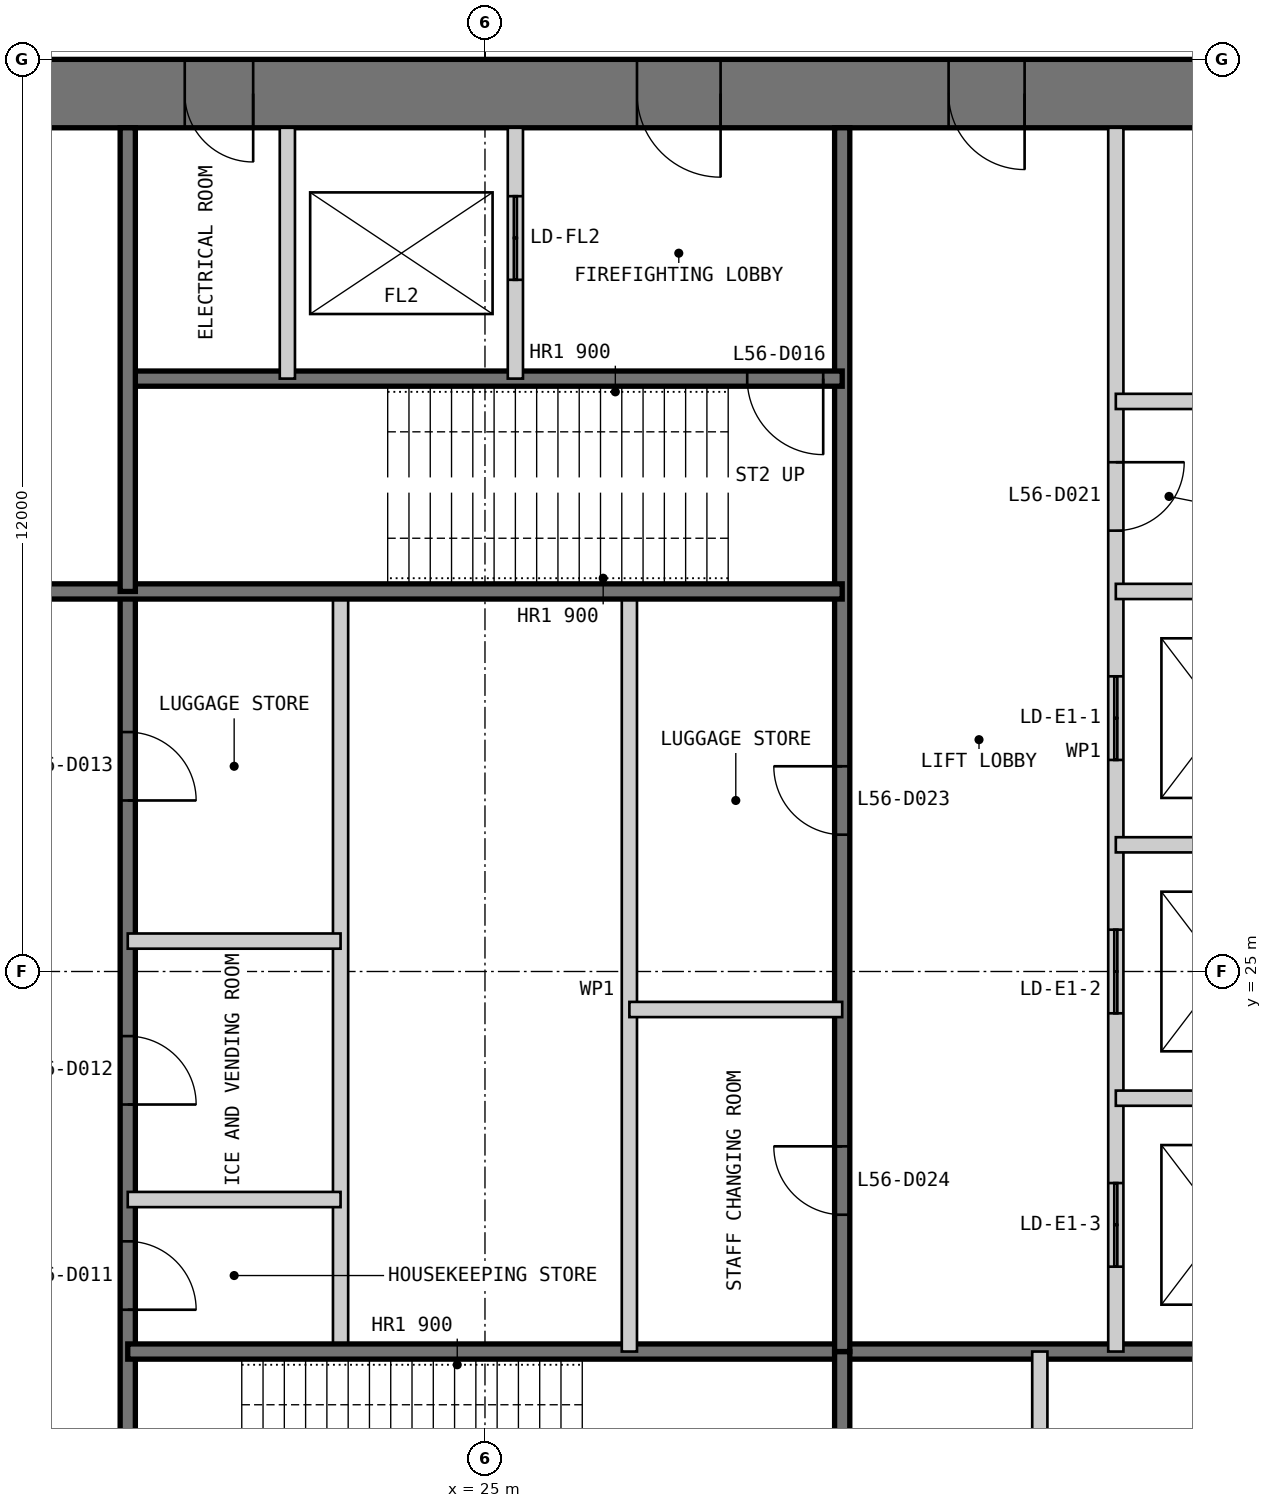
"""IFC4 building model, lengths in metres.
Left out: names, types, materials, properties, quantities, classifications, styles, units other than length and angle.
Written with IfcOpenShell. Run it as: python <this file> out.ifc"""

import sys

from ifc_helpers import new_model, si_unit, direction, frame, frame_2d, origin, place, context, subcontext, project, spatial, polyline, rectangle, outline, extrude, element, fill, save


model = new_model("IFC4")
c1 = context("Model", 3, precision=1e-05, world=origin(), true_north=direction((0.0, 1.0)))
c2 = subcontext(c1, "Body", "Model", "MODEL_VIEW")
j1 = project(units=[si_unit("LENGTHUNIT", "METRE"), si_unit("PLANEANGLEUNIT", "RADIAN")], contexts=[c1])
p1 = place(None, origin())
s1 = spatial("IfcSite", under=j1, at=p1, CompositionType="ELEMENT")
p2 = place(p1, origin())
s2 = spatial("IfcBuilding", under=s1, at=p2, CompositionType="ELEMENT")
p3 = place(p2, frame((0.0, 0.0, 239.8)))
s3 = spatial("IfcBuildingStorey", under=s2, at=p3, CompositionType="ELEMENT", Elevation=239.8)
p4 = place(p3, frame((37.0, 36.55, 0.0), z_axis=(0.0, 0.0, 1.0), x_axis=(-1.0, 0.0, 0.0)))
e1 = element("IfcWall", 1, at=p4, inside=s3, PredefinedType="SHEAR", context=c2, shape_type="SweptSolid", body=[
    extrude(outline(polyline([(0.0, -0.45), (24.0, -0.45), (23.1, 0.45), (0.9, 0.45), (0.0, -0.45)])), origin(), (0.0, 0.0, 1.0), 6.0),
])
p5 = place(p4, frame((4.9, 0.0, 0.0)))
e2 = element("IfcOpeningElement", 2, at=p5, cuts=e1, PredefinedType="OPENING", context=c2, shape_type="SweptSolid", body=[
    extrude(rectangle(XDim=1.0, YDim=2.2, at=frame_2d((0.5, 1.1))), frame((0.0, 0.46, 0.0), z_axis=(0.0, -1.0, 0.0), x_axis=(1.0, 0.0, 0.0)), (0.0, 0.0, 1.0), 0.92),
])
p6 = place(p4, frame((8.9, 0.0, 0.0)))
e3 = element("IfcOpeningElement", 3, at=p6, cuts=e1, PredefinedType="OPENING", context=c2, shape_type="SweptSolid", body=[
    extrude(rectangle(XDim=1.1, YDim=2.2, at=frame_2d((0.55, 1.1))), frame((0.0, 0.46, 0.0), z_axis=(0.0, -1.0, 0.0), x_axis=(1.0, 0.0, 0.0)), (0.0, 0.0, 1.0), 0.92),
])
p7 = place(p4, frame((15.05, 0.0, 0.0)))
e4 = element("IfcOpeningElement", 4, at=p7, cuts=e1, PredefinedType="OPENING", context=c2, shape_type="SweptSolid", body=[
    extrude(rectangle(XDim=0.9, YDim=2.2, at=frame_2d((0.45, 1.1))), frame((0.0, 0.46, 0.0), z_axis=(0.0, -1.0, 0.0), x_axis=(1.0, 0.0, 0.0)), (0.0, 0.0, 1.0), 0.92),
])
p8 = place(p4, frame((17.9, 0.0, 0.0)))
e5 = element("IfcOpeningElement", 5, at=p8, cuts=e1, PredefinedType="OPENING", context=c2, shape_type="SweptSolid", body=[
    extrude(rectangle(XDim=1.0, YDim=2.2, at=frame_2d((0.5, 1.1))), frame((0.0, 0.46, 0.0), z_axis=(0.0, -1.0, 0.0), x_axis=(1.0, 0.0, 0.0)), (0.0, 0.0, 1.0), 0.92),
])
p9 = place(p4, frame((21.4, 0.0, 0.0)))
e6 = element("IfcOpeningElement", 6, at=p9, cuts=e1, PredefinedType="OPENING", context=c2, shape_type="SweptSolid", body=[
    extrude(rectangle(XDim=1.0, YDim=2.2, at=frame_2d((0.5, 1.1))), frame((0.0, 0.46, 0.0), z_axis=(0.0, -1.0, 0.0), x_axis=(1.0, 0.0, 0.0)), (0.0, 0.0, 1.0), 0.92),
])
p10 = place(p3, frame((20.3, 13.9, 0.0), z_axis=(0.0, 0.0, 1.0), x_axis=(0.0, 1.0, 0.0)))
e7 = element("IfcWall", 7, at=p10, inside=s3, PredefinedType="SOLIDWALL", context=c2, shape_type="SweptSolid", body=[
    extrude(rectangle(XDim=16.1, YDim=0.2, at=frame_2d((8.05, 0.0))), origin(), (0.0, 0.0, 1.0), 5.8),
])
p11 = place(p10, frame((6.65, 0.0, 0.0)))
e8 = element("IfcOpeningElement", 8, at=p11, cuts=e7, PredefinedType="OPENING", context=c2, shape_type="SweptSolid", body=[
    extrude(rectangle(XDim=0.9, YDim=2.2, at=frame_2d((0.45, 1.1))), frame((0.0, 0.11, 0.0), z_axis=(0.0, -1.0, 0.0), x_axis=(1.0, 0.0, 0.0)), (0.0, 0.0, 1.0), 0.22),
])
p12 = place(p10, frame((9.35, 0.0, 0.0)))
e9 = element("IfcOpeningElement", 9, at=p12, cuts=e7, PredefinedType="OPENING", context=c2, shape_type="SweptSolid", body=[
    extrude(rectangle(XDim=0.9, YDim=2.2, at=frame_2d((0.45, 1.1))), frame((0.0, 0.11, 0.0), z_axis=(0.0, -1.0, 0.0), x_axis=(1.0, 0.0, 0.0)), (0.0, 0.0, 1.0), 0.22),
])
p13 = place(p10, frame((13.35, 0.0, 0.0)))
e10 = element("IfcOpeningElement", 10, at=p13, cuts=e7, PredefinedType="OPENING", context=c2, shape_type="SweptSolid", body=[
    extrude(rectangle(XDim=0.9, YDim=2.2, at=frame_2d((0.45, 1.1))), frame((0.0, 0.11, 0.0), z_axis=(0.0, -1.0, 0.0), x_axis=(1.0, 0.0, 0.0)), (0.0, 0.0, 1.0), 0.22),
])
p14 = place(p3, frame((23.1, 20.0, 0.0), z_axis=(0.0, 0.0, 1.0), x_axis=(0.0, 1.0, 0.0)))
e11 = element("IfcWall", 11, at=p14, inside=s3, PredefinedType="PARTITIONING", context=c2, shape_type="SweptSolid", body=[
    extrude(rectangle(XDim=10.0, YDim=0.2, at=frame_2d((5.0, 0.0))), origin(), (0.0, 0.0, 1.0), 5.8),
])
p15 = place(p3, frame((20.3, 20.0, 0.0), z_axis=(0.0, 0.0, 1.0), x_axis=(1.0, 0.0, 0.0)))
e12 = element("IfcWall", 12, at=p15, inside=s3, PredefinedType="SOLIDWALL", context=c2, shape_type="SweptSolid", body=[
    extrude(rectangle(XDim=15.8, YDim=0.2, at=frame_2d((7.9, 0.0))), origin(), (0.0, 0.0, 1.0), 5.8),
])
p16 = place(p3, frame((29.7, 13.9, 0.0), z_axis=(0.0, 0.0, 1.0), x_axis=(0.0, 1.0, 0.0)))
e13 = element("IfcWall", 13, at=p16, inside=s3, PredefinedType="SOLIDWALL", context=c2, shape_type="SweptSolid", body=[
    extrude(rectangle(XDim=6.1, YDim=0.2, at=frame_2d((3.05, 0.0))), origin(), (0.0, 0.0, 1.0), 5.8),
])
p17 = place(p3, frame((32.3, 13.9, 0.0), z_axis=(0.0, 0.0, 1.0), x_axis=(0.0, 1.0, 0.0)))
e14 = element("IfcWall", 14, at=p17, inside=s3, PredefinedType="PARTITIONING", context=c2, shape_type="SweptSolid", body=[
    extrude(rectangle(XDim=6.1, YDim=0.2, at=frame_2d((3.05, 0.0))), origin(), (0.0, 0.0, 1.0), 5.8),
])
for number, where, z_axis, x_axis in (
    (15, (20.3, 22.0, 0.0), (0.0, 0.0, 1.0), (1.0, 0.0, 0.0)),
    (16, (20.3, 25.4, 0.0), (0.0, 0.0, 1.0), (1.0, 0.0, 0.0)),
):
    element("IfcWall", number, at=place(p3, frame(where, z_axis=z_axis, x_axis=x_axis)), inside=s3, PredefinedType="PARTITIONING", context=c2, shape_type="SweptSolid", body=[
        extrude(rectangle(XDim=2.8, YDim=0.2, at=frame_2d((1.4, 0.0))), origin(), (0.0, 0.0, 1.0), 5.8),
    ])
p18 = place(p3, frame((33.3, 36.1, 0.0), z_axis=(0.0, 0.0, 1.0), x_axis=(0.0, -1.0, 0.0)))
e17 = element("IfcWall", 17, at=p18, inside=s3, PredefinedType="PARTITIONING", context=c2, shape_type="SweptSolid", body=[
    extrude(rectangle(XDim=16.1, YDim=0.2, at=frame_2d((8.05, 0.0))), origin(), (0.0, 0.0, 1.0), 5.8),
])
p19 = place(p18, frame((4.4, 0.0, 0.0)))
e18 = element("IfcOpeningElement", 18, at=p19, cuts=e17, PredefinedType="OPENING", context=c2, shape_type="SweptSolid", body=[
    extrude(rectangle(XDim=0.9, YDim=2.2, at=frame_2d((0.45, 1.1))), frame((0.0, 0.11, 0.0), z_axis=(0.0, -1.0, 0.0), x_axis=(1.0, 0.0, 0.0)), (0.0, 0.0, 1.0), 0.22),
])
p20 = place(p18, frame((7.217, 0.0, 0.0)))
e19 = element("IfcOpeningElement", 19, at=p20, cuts=e17, PredefinedType="OPENING", context=c2, shape_type="SweptSolid", body=[
    extrude(rectangle(XDim=1.1, YDim=2.2, at=frame_2d((0.55, 1.1))), frame((0.0, 0.11, 0.0), z_axis=(0.0, -1.0, 0.0), x_axis=(1.0, 0.0, 0.0)), (0.0, 0.0, 1.0), 0.22),
])
p21 = place(p18, frame((10.55, 0.0, 0.0)))
e20 = element("IfcOpeningElement", 20, at=p21, cuts=e17, PredefinedType="OPENING", context=c2, shape_type="SweptSolid", body=[
    extrude(rectangle(XDim=1.1, YDim=2.2, at=frame_2d((0.55, 1.1))), frame((0.0, 0.11, 0.0), z_axis=(0.0, -1.0, 0.0), x_axis=(1.0, 0.0, 0.0)), (0.0, 0.0, 1.0), 0.22),
])
p22 = place(p18, frame((13.883, 0.0, 0.0)))
e21 = element("IfcOpeningElement", 21, at=p22, cuts=e17, PredefinedType="OPENING", context=c2, shape_type="SweptSolid", body=[
    extrude(rectangle(XDim=1.1, YDim=2.2, at=frame_2d((0.55, 1.1))), frame((0.0, 0.11, 0.0), z_axis=(0.0, -1.0, 0.0), x_axis=(1.0, 0.0, 0.0)), (0.0, 0.0, 1.0), 0.22),
])
p23 = place(p3, frame((29.7, 36.1, 0.0), z_axis=(0.0, 0.0, 1.0), x_axis=(0.0, -1.0, 0.0)))
e22 = element("IfcWall", 22, at=p23, inside=s3, PredefinedType="SOLIDWALL", context=c2, shape_type="SweptSolid", body=[
    extrude(rectangle(XDim=16.1, YDim=0.2, at=frame_2d((8.05, 0.0))), origin(), (0.0, 0.0, 1.0), 5.8),
])
p24 = place(p23, frame((8.4, 0.0, 0.0)))
e23 = element("IfcOpeningElement", 23, at=p24, cuts=e22, PredefinedType="OPENING", context=c2, shape_type="SweptSolid", body=[
    extrude(rectangle(XDim=0.9, YDim=2.2, at=frame_2d((0.45, 1.1))), frame((0.0, 0.11, 0.0), z_axis=(0.0, -1.0, 0.0), x_axis=(1.0, 0.0, 0.0)), (0.0, 0.0, 1.0), 0.22),
])
p25 = place(p23, frame((13.4, 0.0, 0.0)))
e24 = element("IfcOpeningElement", 24, at=p25, cuts=e22, PredefinedType="OPENING", context=c2, shape_type="SweptSolid", body=[
    extrude(rectangle(XDim=0.9, YDim=2.2, at=frame_2d((0.45, 1.1))), frame((0.0, 0.11, 0.0), z_axis=(0.0, -1.0, 0.0), x_axis=(1.0, 0.0, 0.0)), (0.0, 0.0, 1.0), 0.22),
])
for number, where, z_axis, x_axis in (
    (25, (36.1, 30.0, 0.0), (0.0, 0.0, 1.0), (-1.0, 0.0, 0.0)),
    (26, (36.1, 26.667, 0.0), (0.0, 0.0, 1.0), (-1.0, 0.0, 0.0)),
    (27, (36.1, 23.333, 0.0), (0.0, 0.0, 1.0), (-1.0, 0.0, 0.0)),
):
    element("IfcWall", number, at=place(p3, frame(where, z_axis=z_axis, x_axis=x_axis)), inside=s3, PredefinedType="PARTITIONING", context=c2, shape_type="SweptSolid", body=[
        extrude(rectangle(XDim=2.8, YDim=0.2, at=frame_2d((1.4, 0.0))), origin(), (0.0, 0.0, 1.0), 5.8),
    ])
p26 = place(p3, frame((26.9, 30.0, 0.0), z_axis=(0.0, 0.0, 1.0), x_axis=(0.0, -1.0, 0.0)))
e28 = element("IfcWall", 28, at=p26, inside=s3, PredefinedType="PARTITIONING", context=c2, shape_type="SweptSolid", body=[
    extrude(rectangle(XDim=10.0, YDim=0.2, at=frame_2d((5.0, 0.0))), origin(), (0.0, 0.0, 1.0), 5.8),
])
p27 = place(p3, frame((29.7, 32.8, 0.0), z_axis=(0.0, 0.0, 1.0), x_axis=(-1.0, 0.0, 0.0)))
e29 = element("IfcWall", 29, at=p27, inside=s3, PredefinedType="SOLIDWALL", context=c2, shape_type="SweptSolid", body=[
    extrude(rectangle(XDim=9.4, YDim=0.2, at=frame_2d((4.7, 0.0))), origin(), (0.0, 0.0, 1.0), 5.8),
])
p28 = place(p27, frame((0.25, 0.0, 0.0)))
e30 = element("IfcOpeningElement", 30, at=p28, cuts=e29, PredefinedType="OPENING", context=c2, shape_type="SweptSolid", body=[
    extrude(rectangle(XDim=1.0, YDim=2.2, at=frame_2d((0.5, 1.1))), frame((0.0, 0.11, 0.0), z_axis=(0.0, -1.0, 0.0), x_axis=(1.0, 0.0, 0.0)), (0.0, 0.0, 1.0), 0.22),
])
p29 = place(p3, frame((29.7, 30.0, 0.0), z_axis=(0.0, 0.0, 1.0), x_axis=(-1.0, 0.0, 0.0)))
e31 = element("IfcWall", 31, at=p29, inside=s3, PredefinedType="SOLIDWALL", context=c2, shape_type="SweptSolid", body=[
    extrude(rectangle(XDim=15.8, YDim=0.2, at=frame_2d((7.9, 0.0))), origin(), (0.0, 0.0, 1.0), 5.8),
])
p30 = place(p3, frame((25.4, 36.1, 0.0), z_axis=(0.0, 0.0, 1.0), x_axis=(0.0, -1.0, 0.0)))
e32 = element("IfcWall", 32, at=p30, inside=s3, PredefinedType="PARTITIONING", context=c2, shape_type="SweptSolid", body=[
    extrude(rectangle(XDim=3.3, YDim=0.2, at=frame_2d((1.65, 0.0))), origin(), (0.0, 0.0, 1.0), 5.8),
])
p31 = place(p30, frame((0.9, 0.0, 0.0)))
e33 = element("IfcOpeningElement", 33, at=p31, cuts=e32, PredefinedType="OPENING", context=c2, shape_type="SweptSolid", body=[
    extrude(rectangle(XDim=1.1, YDim=2.2, at=frame_2d((0.55, 1.1))), frame((0.0, 0.11, 0.0), z_axis=(0.0, -1.0, 0.0), x_axis=(1.0, 0.0, 0.0)), (0.0, 0.0, 1.0), 0.22),
])
p32 = place(p3, frame((22.4, 36.1, 0.0), z_axis=(0.0, 0.0, 1.0), x_axis=(0.0, -1.0, 0.0)))
e34 = element("IfcWall", 34, at=p32, inside=s3, PredefinedType="PARTITIONING", context=c2, shape_type="SweptSolid", body=[
    extrude(rectangle(XDim=3.3, YDim=0.2, at=frame_2d((1.65, 0.0))), origin(), (0.0, 0.0, 1.0), 5.8),
])
p33 = place(p3, frame((20.3, 36.1, 0.0), z_axis=(0.0, 0.0, 1.0), x_axis=(0.0, -1.0, 0.0)))
e35 = element("IfcWall", 35, at=p33, inside=s3, PredefinedType="SOLIDWALL", context=c2, shape_type="SweptSolid", body=[
    extrude(rectangle(XDim=6.1, YDim=0.2, at=frame_2d((3.05, 0.0))), origin(), (0.0, 0.0, 1.0), 5.8),
])
for number, where, z_axis, x_axis in (
    (36, (36.1, 32.5, 0.0), (0.0, 0.0, 1.0), (-1.0, 0.0, 0.0)),
    (37, (29.7, 24.5, 0.0), (0.0, 0.0, 1.0), (-1.0, 0.0, 0.0)),
):
    element("IfcWall", number, at=place(p3, frame(where, z_axis=z_axis, x_axis=x_axis)), inside=s3, PredefinedType="PARTITIONING", context=c2, shape_type="SweptSolid", body=[
        extrude(rectangle(XDim=2.8, YDim=0.2, at=frame_2d((1.4, 0.0))), origin(), (0.0, 0.0, 1.0), 5.8),
    ])
p34 = place(p11, frame((0.9, 0.0, 0.0), z_axis=(0.0, 0.0, 1.0), x_axis=(-1.0, 0.0, 0.0)))
e38 = element("IfcDoor", 38, at=p34, inside=s3, OperationType="SINGLE_SWING_RIGHT", PredefinedType="DOOR", context=c2, shape_type="SweptSolid", body=[
    extrude(rectangle(XDim=0.9, YDim=2.2, at=frame_2d((0.45, 1.1))), frame((0.0, 0.025, 0.0), z_axis=(0.0, -1.0, 0.0), x_axis=(1.0, 0.0, 0.0)), (0.0, 0.0, 1.0), 0.05),
])
fill(e8, e38)
p35 = place(p12, frame((0.9, 0.0, 0.0), z_axis=(0.0, 0.0, 1.0), x_axis=(-1.0, 0.0, 0.0)))
e39 = element("IfcDoor", 39, at=p35, inside=s3, OperationType="SINGLE_SWING_RIGHT", PredefinedType="DOOR", context=c2, shape_type="SweptSolid", body=[
    extrude(rectangle(XDim=0.9, YDim=2.2, at=frame_2d((0.45, 1.1))), frame((0.0, 0.025, 0.0), z_axis=(0.0, -1.0, 0.0), x_axis=(1.0, 0.0, 0.0)), (0.0, 0.0, 1.0), 0.05),
])
fill(e9, e39)
p36 = place(p13, frame((0.9, 0.0, 0.0), z_axis=(0.0, 0.0, 1.0), x_axis=(-1.0, 0.0, 0.0)))
e40 = element("IfcDoor", 40, at=p36, inside=s3, OperationType="SINGLE_SWING_RIGHT", PredefinedType="DOOR", context=c2, shape_type="SweptSolid", body=[
    extrude(rectangle(XDim=0.9, YDim=2.2, at=frame_2d((0.45, 1.1))), frame((0.0, 0.025, 0.0), z_axis=(0.0, -1.0, 0.0), x_axis=(1.0, 0.0, 0.0)), (0.0, 0.0, 1.0), 0.05),
])
fill(e10, e40)
p37 = place(p5, origin())
e41 = element("IfcDoor", 41, at=p37, inside=s3, OperationType="SINGLE_SWING_LEFT", PredefinedType="DOOR", context=c2, shape_type="SweptSolid", body=[
    extrude(rectangle(XDim=1.0, YDim=2.2, at=frame_2d((0.5, 1.1))), frame((0.0, 0.025, 0.0), z_axis=(0.0, -1.0, 0.0), x_axis=(1.0, 0.0, 0.0)), (0.0, 0.0, 1.0), 0.05),
    extrude(outline(polyline([(0.0, 0.0), (0.04, 0.0), (0.04, 2.16), (0.96, 2.16), (0.96, 0.0), (1.0, 0.0), (1.0, 2.2), (0.0, 2.2), (0.0, 0.0)])), frame((0.0, 0.3, 0.0), z_axis=(0.0, -1.0, 0.0), x_axis=(1.0, 0.0, 0.0)), (0.0, 0.0, 1.0), 0.6),
])
fill(e2, e41)
p38 = place(p6, origin())
e42 = element("IfcDoor", 42, at=p38, inside=s3, OperationType="SINGLE_SWING_LEFT", PredefinedType="DOOR", context=c2, shape_type="SweptSolid", body=[
    extrude(rectangle(XDim=1.1, YDim=2.2, at=frame_2d((0.55, 1.1))), frame((0.0, 0.025, 0.0), z_axis=(0.0, -1.0, 0.0), x_axis=(1.0, 0.0, 0.0)), (0.0, 0.0, 1.0), 0.05),
    extrude(outline(polyline([(0.0, 0.0), (0.04, 0.0), (0.04, 2.16), (1.06, 2.16), (1.06, 0.0), (1.1, 0.0), (1.1, 2.2), (0.0, 2.2), (0.0, 0.0)])), frame((0.0, 0.3, 0.0), z_axis=(0.0, -1.0, 0.0), x_axis=(1.0, 0.0, 0.0)), (0.0, 0.0, 1.0), 0.6),
])
fill(e3, e42)
p39 = place(p28, origin())
e43 = element("IfcDoor", 43, at=p39, inside=s3, OperationType="SINGLE_SWING_LEFT", PredefinedType="DOOR", context=c2, shape_type="SweptSolid", body=[
    extrude(rectangle(XDim=1.0, YDim=2.2, at=frame_2d((0.5, 1.1))), frame((0.0, 0.025, 0.0), z_axis=(0.0, -1.0, 0.0), x_axis=(1.0, 0.0, 0.0)), (0.0, 0.0, 1.0), 0.05),
])
fill(e30, e43)
p40 = place(p7, origin())
e44 = element("IfcDoor", 44, at=p40, inside=s3, OperationType="SINGLE_SWING_LEFT", PredefinedType="DOOR", context=c2, shape_type="SweptSolid", body=[
    extrude(rectangle(XDim=0.9, YDim=2.2, at=frame_2d((0.45, 1.1))), frame((0.0, 0.025, 0.0), z_axis=(0.0, -1.0, 0.0), x_axis=(1.0, 0.0, 0.0)), (0.0, 0.0, 1.0), 0.05),
    extrude(outline(polyline([(0.0, 0.0), (0.04, 0.0), (0.04, 2.16), (0.86, 2.16), (0.86, 0.0), (0.9, 0.0), (0.9, 2.2), (0.0, 2.2), (0.0, 0.0)])), frame((0.0, 0.3, 0.0), z_axis=(0.0, -1.0, 0.0), x_axis=(1.0, 0.0, 0.0)), (0.0, 0.0, 1.0), 0.6),
])
fill(e4, e44)
p41 = place(p19, origin())
e45 = element("IfcDoor", 45, at=p41, inside=s3, OperationType="SINGLE_SWING_LEFT", PredefinedType="DOOR", context=c2, shape_type="SweptSolid", body=[
    extrude(rectangle(XDim=0.9, YDim=2.2, at=frame_2d((0.45, 1.1))), frame((0.0, 0.025, 0.0), z_axis=(0.0, -1.0, 0.0), x_axis=(1.0, 0.0, 0.0)), (0.0, 0.0, 1.0), 0.05),
])
fill(e18, e45)
p42 = place(p24, frame((0.9, 0.0, 0.0), z_axis=(0.0, 0.0, 1.0), x_axis=(-1.0, 0.0, 0.0)))
e46 = element("IfcDoor", 46, at=p42, inside=s3, OperationType="SINGLE_SWING_RIGHT", PredefinedType="DOOR", context=c2, shape_type="SweptSolid", body=[
    extrude(rectangle(XDim=0.9, YDim=2.2, at=frame_2d((0.45, 1.1))), frame((0.0, 0.025, 0.0), z_axis=(0.0, -1.0, 0.0), x_axis=(1.0, 0.0, 0.0)), (0.0, 0.0, 1.0), 0.05),
])
fill(e23, e46)
p43 = place(p25, frame((0.9, 0.0, 0.0), z_axis=(0.0, 0.0, 1.0), x_axis=(-1.0, 0.0, 0.0)))
e47 = element("IfcDoor", 47, at=p43, inside=s3, OperationType="SINGLE_SWING_RIGHT", PredefinedType="DOOR", context=c2, shape_type="SweptSolid", body=[
    extrude(rectangle(XDim=0.9, YDim=2.2, at=frame_2d((0.45, 1.1))), frame((0.0, 0.025, 0.0), z_axis=(0.0, -1.0, 0.0), x_axis=(1.0, 0.0, 0.0)), (0.0, 0.0, 1.0), 0.05),
])
fill(e24, e47)
p44 = place(p31, origin())
e48 = element("IfcDoor", 48, at=p44, inside=s3, OperationType="DOUBLE_DOOR_SLIDING", PredefinedType="DOOR", context=c2, shape_type="SweptSolid", body=[
    extrude(rectangle(XDim=1.1, YDim=2.2, at=frame_2d((0.55, 1.1))), frame((0.0, 0.025, 0.0), z_axis=(0.0, -1.0, 0.0), x_axis=(1.0, 0.0, 0.0)), (0.0, 0.0, 1.0), 0.05),
])
fill(e33, e48)
p45 = place(p20, origin())
e49 = element("IfcDoor", 49, at=p45, inside=s3, OperationType="DOUBLE_DOOR_SLIDING", PredefinedType="DOOR", context=c2, shape_type="SweptSolid", body=[
    extrude(rectangle(XDim=1.1, YDim=2.2, at=frame_2d((0.55, 1.1))), frame((0.0, 0.025, 0.0), z_axis=(0.0, -1.0, 0.0), x_axis=(1.0, 0.0, 0.0)), (0.0, 0.0, 1.0), 0.05),
])
fill(e19, e49)
p46 = place(p21, origin())
e50 = element("IfcDoor", 50, at=p46, inside=s3, OperationType="DOUBLE_DOOR_SLIDING", PredefinedType="DOOR", context=c2, shape_type="SweptSolid", body=[
    extrude(rectangle(XDim=1.1, YDim=2.2, at=frame_2d((0.55, 1.1))), frame((0.0, 0.025, 0.0), z_axis=(0.0, -1.0, 0.0), x_axis=(1.0, 0.0, 0.0)), (0.0, 0.0, 1.0), 0.05),
])
fill(e20, e50)
p47 = place(p22, origin())
e51 = element("IfcDoor", 51, at=p47, inside=s3, OperationType="DOUBLE_DOOR_SLIDING", PredefinedType="DOOR", context=c2, shape_type="SweptSolid", body=[
    extrude(rectangle(XDim=1.1, YDim=2.2, at=frame_2d((0.55, 1.1))), frame((0.0, 0.025, 0.0), z_axis=(0.0, -1.0, 0.0), x_axis=(1.0, 0.0, 0.0)), (0.0, 0.0, 1.0), 0.05),
])
fill(e21, e51)
save(model, sys.argv[1])
